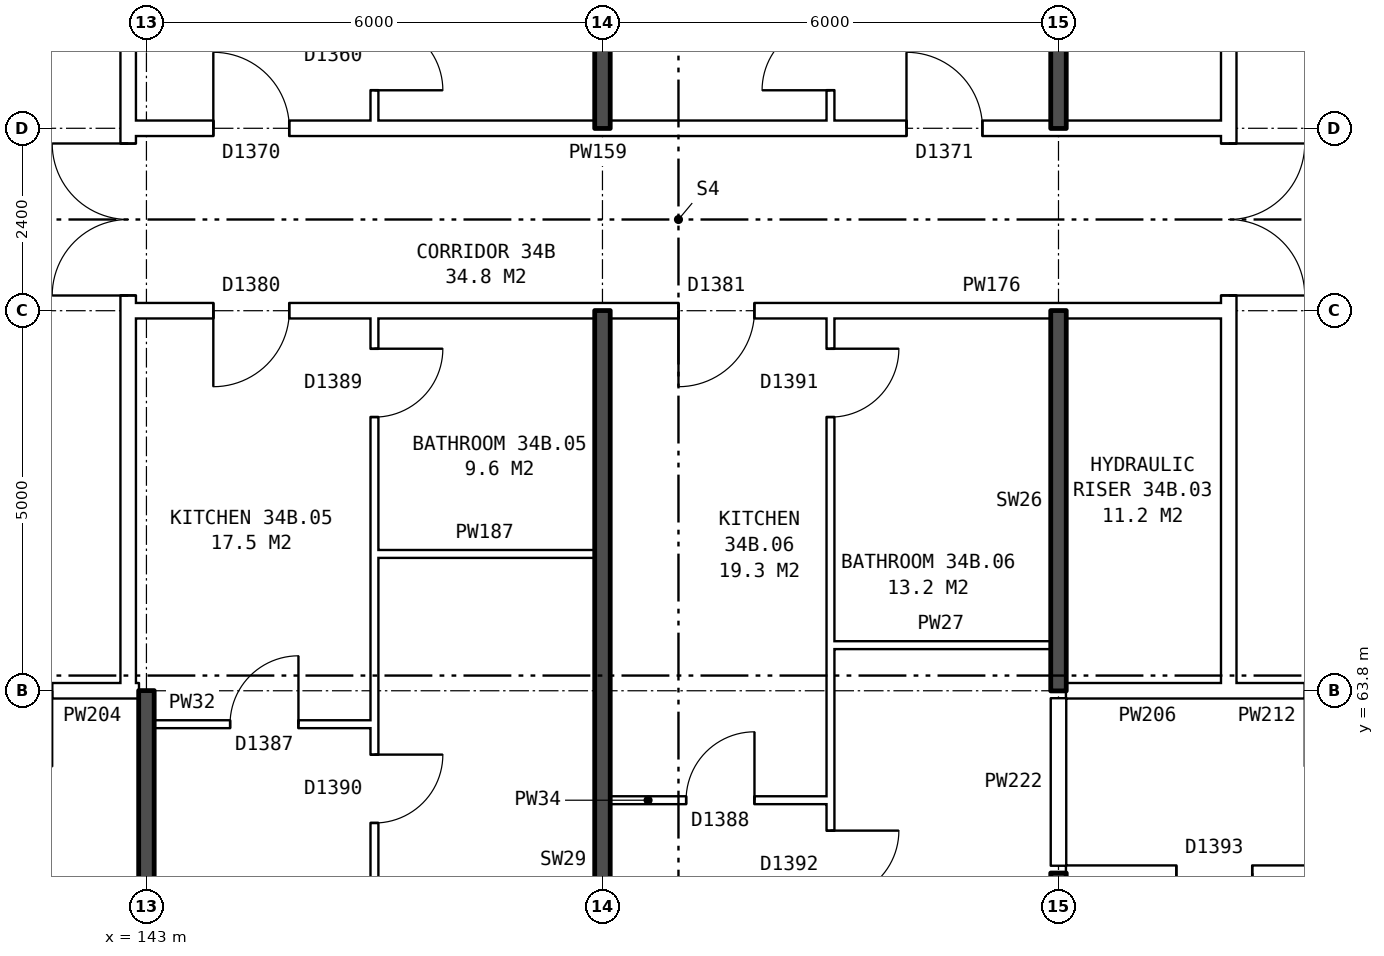
"""IFC4 building model, lengths in metres.
Left out: names, types, materials, properties, quantities, classifications, styles, units other than length and angle.
Written with IfcOpenShell. Run it as: python <this file> out.ifc"""

import sys

from ifc_helpers import new_model, si_unit, direction, frame, frame_2d, origin, place, context, subcontext, project, spatial, rectangle, extrude, element, fill, save


model = new_model("IFC4")
c1 = context("Model", 3, precision=1e-05, world=origin(), true_north=direction((0.0, 1.0)))
c2 = subcontext(c1, "Body", "Model", "MODEL_VIEW")
j1 = project(units=[si_unit("LENGTHUNIT", "METRE"), si_unit("PLANEANGLEUNIT", "RADIAN")], contexts=[c1])
p1 = place(None, origin())
s1 = spatial("IfcSite", under=j1, at=p1, CompositionType="ELEMENT")
p2 = place(p1, origin())
s2 = spatial("IfcBuilding", under=s1, at=p2, CompositionType="ELEMENT")
p3 = place(p2, frame((0.0, 0.0, 123.7)))
s3 = spatial("IfcBuildingStorey", under=s2, at=p3, CompositionType="ELEMENT", Elevation=123.7)
p4 = place(p3, frame((142.76, 63.9, 0.0), z_axis=(0.0, 0.0, 1.0), x_axis=(0.0, 1.0, 0.0)))
e1 = element("IfcWall", 1, at=p4, inside=s3, PredefinedType="PARTITIONING", context=c2, shape_type="SweptSolid", body=[
    extrude(rectangle(XDim=12.2, YDim=0.2, at=frame_2d((6.1, 0.0))), origin(), (0.0, 0.0, 1.0), 2.85),
])
p5 = place(p4, frame((5.1, 0.0, 0.0)))
e2 = element("IfcOpeningElement", 2, at=p5, cuts=e1, PredefinedType="OPENING", context=c2, shape_type="SweptSolid", body=[
    extrude(rectangle(XDim=2.0, YDim=2.1, at=frame_2d((1.0, 1.05))), frame((0.0, 0.11, 0.0), z_axis=(0.0, -1.0, 0.0), x_axis=(1.0, 0.0, 0.0)), (0.0, 0.0, 1.0), 0.22),
])
p6 = place(p3, frame((157.24, 63.9, 0.0), z_axis=(0.0, 0.0, 1.0), x_axis=(0.0, 1.0, 0.0)))
e3 = element("IfcWall", 3, at=p6, inside=s3, PredefinedType="PARTITIONING", context=c2, shape_type="SweptSolid", body=[
    extrude(rectangle(XDim=12.2, YDim=0.2, at=frame_2d((6.1, 0.0))), origin(), (0.0, 0.0, 1.0), 2.85),
])
p7 = place(p6, frame((5.1, 0.0, 0.0)))
e4 = element("IfcOpeningElement", 4, at=p7, cuts=e3, PredefinedType="OPENING", context=c2, shape_type="SweptSolid", body=[
    extrude(rectangle(XDim=2.0, YDim=2.1, at=frame_2d((1.0, 1.05))), frame((0.0, 0.11, 0.0), z_axis=(0.0, -1.0, 0.0), x_axis=(1.0, 0.0, 0.0)), (0.0, 0.0, 1.0), 0.22),
])
p8 = place(p3, frame((155.1, 61.4, 0.0), z_axis=(0.0, 0.0, 1.0), x_axis=(1.0, 0.0, 0.0)))
e5 = element("IfcWall", 5, at=p8, inside=s3, PredefinedType="PARTITIONING", context=c2, shape_type="SweptSolid", body=[
    extrude(rectangle(XDim=17.29, YDim=0.2, at=frame_2d((8.645, 0.0))), origin(), (0.0, 0.0, 1.0), 2.85),
])
p9 = place(p8, frame((1.45, 0.0, 0.0)))
e6 = element("IfcOpeningElement", 6, at=p9, cuts=e5, PredefinedType="OPENING", context=c2, shape_type="SweptSolid", body=[
    extrude(rectangle(XDim=1.0, YDim=2.1, at=frame_2d((0.5, 1.05))), frame((0.0, 0.11, 0.0), z_axis=(0.0, -1.0, 0.0), x_axis=(1.0, 0.0, 0.0)), (0.0, 0.0, 1.0), 0.22),
])
p10 = place(p8, frame((8.4, 0.0, 0.0)))
e7 = element("IfcOpeningElement", 7, at=p10, cuts=e5, PredefinedType="OPENING", context=c2, shape_type="SweptSolid", body=[
    extrude(rectangle(XDim=1.0, YDim=2.1, at=frame_2d((0.5, 1.05))), frame((0.0, 0.11, 0.0), z_axis=(0.0, -1.0, 0.0), x_axis=(1.0, 0.0, 0.0)), (0.0, 0.0, 1.0), 0.22),
])
p11 = place(p3, frame((149.1, 62.36, 0.0), z_axis=(0.0, 0.0, 1.0), x_axis=(1.0, 0.0, 0.0)))
e8 = element("IfcWall", 8, at=p11, inside=s3, PredefinedType="PARTITIONING", context=c2, shape_type="SweptSolid", body=[
    extrude(rectangle(XDim=2.9, YDim=0.1, at=frame_2d((1.45, 0.0))), origin(), (0.0, 0.0, 1.0), 2.85),
])
p12 = place(p11, frame((1.0, 0.0, 0.0)))
e9 = element("IfcOpeningElement", 9, at=p12, cuts=e8, PredefinedType="OPENING", context=c2, shape_type="SweptSolid", body=[
    extrude(rectangle(XDim=0.9, YDim=2.1, at=frame_2d((0.45, 1.05))), frame((0.0, 0.06, 0.0), z_axis=(0.0, -1.0, 0.0), x_axis=(1.0, 0.0, 0.0)), (0.0, 0.0, 1.0), 0.12),
])
p13 = place(p3, frame((143.1, 63.36, 0.0), z_axis=(0.0, 0.0, 1.0), x_axis=(1.0, 0.0, 0.0)))
e10 = element("IfcWall", 10, at=p13, inside=s3, PredefinedType="PARTITIONING", context=c2, shape_type="SweptSolid", body=[
    extrude(rectangle(XDim=2.9, YDim=0.1, at=frame_2d((1.45, 0.0))), origin(), (0.0, 0.0, 1.0), 2.85),
])
p14 = place(p13, frame((1.0, 0.0, 0.0)))
e11 = element("IfcOpeningElement", 11, at=p14, cuts=e10, PredefinedType="OPENING", context=c2, shape_type="SweptSolid", body=[
    extrude(rectangle(XDim=0.9, YDim=2.1, at=frame_2d((0.45, 1.05))), frame((0.0, 0.06, 0.0), z_axis=(0.0, -1.0, 0.0), x_axis=(1.0, 0.0, 0.0)), (0.0, 0.0, 1.0), 0.12),
])
p15 = place(p3, frame((139.76, 63.8, 0.0), z_axis=(0.0, 0.0, 1.0), x_axis=(1.0, 0.0, 0.0)))
e12 = element("IfcWall", 12, at=p15, inside=s3, PredefinedType="PARTITIONING", context=c2, shape_type="SweptSolid", body=[
    extrude(rectangle(XDim=3.0, YDim=0.2, at=frame_2d((1.5, 0.0))), origin(), (0.0, 0.0, 1.0), 2.85),
])
p16 = place(p15, frame((1.0, 0.0, 0.0)))
e13 = element("IfcOpeningElement", 13, at=p16, cuts=e12, PredefinedType="OPENING", context=c2, shape_type="SweptSolid", body=[
    extrude(rectangle(XDim=1.0, YDim=2.1, at=frame_2d((0.5, 1.05))), frame((0.0, 0.11, 0.0), z_axis=(0.0, -1.0, 0.0), x_axis=(1.0, 0.0, 0.0)), (0.0, 0.0, 1.0), 0.22),
])
p17 = place(p3, frame((142.76, 63.8, 0.0), z_axis=(0.0, 0.0, 1.0), x_axis=(1.0, 0.0, 0.0)))
e14 = element("IfcWall", 14, at=p17, inside=s3, PredefinedType="PARTITIONING", context=c2, shape_type="SweptSolid", body=[
    extrude(rectangle(XDim=0.14, YDim=0.2, at=frame_2d((0.07, 0.0))), origin(), (0.0, 0.0, 1.0), 2.85),
])
p18 = place(p3, frame((155.1, 63.8, 0.0), z_axis=(0.0, 0.0, 1.0), x_axis=(1.0, 0.0, 0.0)))
e15 = element("IfcWall", 15, at=p18, inside=s3, PredefinedType="PARTITIONING", context=c2, shape_type="SweptSolid", body=[
    extrude(rectangle(XDim=2.14, YDim=0.2, at=frame_2d((1.07, 0.0))), origin(), (0.0, 0.0, 1.0), 2.85),
])
p19 = place(p3, frame((157.24, 63.8, 0.0), z_axis=(0.0, 0.0, 1.0), x_axis=(1.0, 0.0, 0.0)))
e16 = element("IfcWall", 16, at=p19, inside=s3, PredefinedType="PARTITIONING", context=c2, shape_type="SweptSolid", body=[
    extrude(rectangle(XDim=3.0, YDim=0.2, at=frame_2d((1.5, 0.0))), origin(), (0.0, 0.0, 1.0), 2.85),
])
p20 = place(p19, frame((1.0, 0.0, 0.0)))
e17 = element("IfcOpeningElement", 17, at=p20, cuts=e16, PredefinedType="OPENING", context=c2, shape_type="SweptSolid", body=[
    extrude(rectangle(XDim=1.0, YDim=2.1, at=frame_2d((0.5, 1.05))), frame((0.0, 0.11, 0.0), z_axis=(0.0, -1.0, 0.0), x_axis=(1.0, 0.0, 0.0)), (0.0, 0.0, 1.0), 0.22),
])
for number, where, z_axis, x_axis in (
    (18, (152.0, 64.4, 0.0), (0.0, 0.0, 1.0), (1.0, 0.0, 0.0)),
    (19, (146.0, 65.6, 0.0), (0.0, 0.0, 1.0), (1.0, 0.0, 0.0)),
):
    element("IfcWall", number, at=place(p3, frame(where, z_axis=z_axis, x_axis=x_axis)), inside=s3, PredefinedType="PARTITIONING", context=c2, shape_type="SweptSolid", body=[
        extrude(rectangle(XDim=2.9, YDim=0.1, at=frame_2d((1.45, 0.0))), origin(), (0.0, 0.0, 1.0), 2.85),
    ])
p21 = place(p3, frame((142.76, 68.8, 0.0), z_axis=(0.0, 0.0, 1.0), x_axis=(1.0, 0.0, 0.0)))
e20 = element("IfcWall", 20, at=p21, inside=s3, PredefinedType="PARTITIONING", context=c2, shape_type="SweptSolid", body=[
    extrude(rectangle(XDim=14.48, YDim=0.2, at=frame_2d((7.24, 0.0))), origin(), (0.0, 0.0, 1.0), 2.85),
])
p22 = place(p21, frame((1.12, 0.0, 0.0)))
e21 = element("IfcOpeningElement", 21, at=p22, cuts=e20, PredefinedType="OPENING", context=c2, shape_type="SweptSolid", body=[
    extrude(rectangle(XDim=1.0, YDim=2.1, at=frame_2d((0.5, 1.05))), frame((0.0, 0.11, 0.0), z_axis=(0.0, -1.0, 0.0), x_axis=(1.0, 0.0, 0.0)), (0.0, 0.0, 1.0), 0.22),
])
p23 = place(p21, frame((7.24, 0.0, 0.0)))
e22 = element("IfcOpeningElement", 22, at=p23, cuts=e20, PredefinedType="OPENING", context=c2, shape_type="SweptSolid", body=[
    extrude(rectangle(XDim=1.0, YDim=2.1, at=frame_2d((0.5, 1.05))), frame((0.0, 0.11, 0.0), z_axis=(0.0, -1.0, 0.0), x_axis=(1.0, 0.0, 0.0)), (0.0, 0.0, 1.0), 0.22),
])
p24 = place(p3, frame((142.76, 71.2, 0.0), z_axis=(0.0, 0.0, 1.0), x_axis=(1.0, 0.0, 0.0)))
e23 = element("IfcWall", 23, at=p24, inside=s3, PredefinedType="PARTITIONING", context=c2, shape_type="SweptSolid", body=[
    extrude(rectangle(XDim=14.48, YDim=0.2, at=frame_2d((7.24, 0.0))), origin(), (0.0, 0.0, 1.0), 2.85),
])
p25 = place(p24, frame((1.12, 0.0, 0.0)))
e24 = element("IfcOpeningElement", 24, at=p25, cuts=e23, PredefinedType="OPENING", context=c2, shape_type="SweptSolid", body=[
    extrude(rectangle(XDim=1.0, YDim=2.1, at=frame_2d((0.5, 1.05))), frame((0.0, 0.11, 0.0), z_axis=(0.0, -1.0, 0.0), x_axis=(1.0, 0.0, 0.0)), (0.0, 0.0, 1.0), 0.22),
])
p26 = place(p24, frame((10.24, 0.0, 0.0)))
e25 = element("IfcOpeningElement", 25, at=p26, cuts=e23, PredefinedType="OPENING", context=c2, shape_type="SweptSolid", body=[
    extrude(rectangle(XDim=1.0, YDim=2.1, at=frame_2d((0.5, 1.05))), frame((0.0, 0.11, 0.0), z_axis=(0.0, -1.0, 0.0), x_axis=(1.0, 0.0, 0.0)), (0.0, 0.0, 1.0), 0.22),
])
p27 = place(p3, frame((143.0, 54.36, 0.0), z_axis=(0.0, 0.0, 1.0), x_axis=(0.0, 1.0, 0.0)))
e26 = element("IfcWall", 26, at=p27, inside=s3, PredefinedType="SOLIDWALL", context=c2, shape_type="SweptSolid", body=[
    extrude(rectangle(XDim=9.44, YDim=0.2, at=frame_2d((4.72, 0.0))), origin(), (0.0, 0.0, 1.0), 2.85),
])
p28 = place(p3, frame((146.0, 54.36, 0.0), z_axis=(0.0, 0.0, 1.0), x_axis=(0.0, 1.0, 0.0)))
e27 = element("IfcWall", 27, at=p28, inside=s3, PredefinedType="PARTITIONING", context=c2, shape_type="SweptSolid", body=[
    extrude(rectangle(XDim=14.34, YDim=0.1, at=frame_2d((7.17, 0.0))), origin(), (0.0, 0.0, 1.0), 2.85),
])
p29 = place(p28, frame((7.7, 0.0, 0.0)))
e28 = element("IfcOpeningElement", 28, at=p29, cuts=e27, PredefinedType="OPENING", context=c2, shape_type="SweptSolid", body=[
    extrude(rectangle(XDim=0.9, YDim=2.1, at=frame_2d((0.45, 1.05))), frame((0.0, 0.06, 0.0), z_axis=(0.0, -1.0, 0.0), x_axis=(1.0, 0.0, 0.0)), (0.0, 0.0, 1.0), 0.12),
])
p30 = place(p28, frame((13.04, 0.0, 0.0)))
e29 = element("IfcOpeningElement", 29, at=p30, cuts=e27, PredefinedType="OPENING", context=c2, shape_type="SweptSolid", body=[
    extrude(rectangle(XDim=0.9, YDim=2.1, at=frame_2d((0.45, 1.05))), frame((0.0, 0.06, 0.0), z_axis=(0.0, -1.0, 0.0), x_axis=(1.0, 0.0, 0.0)), (0.0, 0.0, 1.0), 0.12),
])
p31 = place(p3, frame((146.0, 71.3, 0.0), z_axis=(0.0, 0.0, 1.0), x_axis=(0.0, 1.0, 0.0)))
e30 = element("IfcWall", 30, at=p31, inside=s3, PredefinedType="PARTITIONING", context=c2, shape_type="SweptSolid", body=[
    extrude(rectangle(XDim=14.34, YDim=0.1, at=frame_2d((7.17, 0.0))), origin(), (0.0, 0.0, 1.0), 2.85),
])
p32 = place(p31, frame((6.74, 0.0, 0.0)))
e31 = element("IfcOpeningElement", 31, at=p32, cuts=e30, PredefinedType="OPENING", context=c2, shape_type="SweptSolid", body=[
    extrude(rectangle(XDim=0.9, YDim=2.1, at=frame_2d((0.45, 1.05))), frame((0.0, 0.06, 0.0), z_axis=(0.0, -1.0, 0.0), x_axis=(1.0, 0.0, 0.0)), (0.0, 0.0, 1.0), 0.12),
])
p33 = place(p31, frame((0.4, 0.0, 0.0)))
e32 = element("IfcOpeningElement", 32, at=p33, cuts=e30, PredefinedType="OPENING", context=c2, shape_type="SweptSolid", body=[
    extrude(rectangle(XDim=0.9, YDim=2.1, at=frame_2d((0.45, 1.05))), frame((0.0, 0.06, 0.0), z_axis=(0.0, -1.0, 0.0), x_axis=(1.0, 0.0, 0.0)), (0.0, 0.0, 1.0), 0.12),
])
for number, where, z_axis, x_axis in (
    (33, (149.0, 54.36, 0.0), (0.0, 0.0, 1.0), (0.0, 1.0, 0.0)),
    (34, (149.0, 71.2, 0.0), (0.0, 0.0, 1.0), (0.0, 1.0, 0.0)),
):
    element("IfcWall", number, at=place(p3, frame(where, z_axis=z_axis, x_axis=x_axis)), inside=s3, PredefinedType="SOLIDWALL", context=c2, shape_type="SweptSolid", body=[
        extrude(rectangle(XDim=14.44, YDim=0.2, at=frame_2d((7.22, 0.0))), origin(), (0.0, 0.0, 1.0), 2.85),
    ])
p34 = place(p3, frame((152.0, 54.36, 0.0), z_axis=(0.0, 0.0, 1.0), x_axis=(0.0, 1.0, 0.0)))
e35 = element("IfcWall", 35, at=p34, inside=s3, PredefinedType="PARTITIONING", context=c2, shape_type="SweptSolid", body=[
    extrude(rectangle(XDim=14.34, YDim=0.1, at=frame_2d((7.17, 0.0))), origin(), (0.0, 0.0, 1.0), 2.85),
])
p35 = place(p34, frame((6.7, 0.0, 0.0)))
e36 = element("IfcOpeningElement", 36, at=p35, cuts=e35, PredefinedType="OPENING", context=c2, shape_type="SweptSolid", body=[
    extrude(rectangle(XDim=0.9, YDim=2.1, at=frame_2d((0.45, 1.05))), frame((0.0, 0.06, 0.0), z_axis=(0.0, -1.0, 0.0), x_axis=(1.0, 0.0, 0.0)), (0.0, 0.0, 1.0), 0.12),
])
p36 = place(p34, frame((13.04, 0.0, 0.0)))
e37 = element("IfcOpeningElement", 37, at=p36, cuts=e35, PredefinedType="OPENING", context=c2, shape_type="SweptSolid", body=[
    extrude(rectangle(XDim=0.9, YDim=2.1, at=frame_2d((0.45, 1.05))), frame((0.0, 0.06, 0.0), z_axis=(0.0, -1.0, 0.0), x_axis=(1.0, 0.0, 0.0)), (0.0, 0.0, 1.0), 0.12),
])
p37 = place(p3, frame((152.0, 71.3, 0.0), z_axis=(0.0, 0.0, 1.0), x_axis=(0.0, 1.0, 0.0)))
e38 = element("IfcWall", 38, at=p37, inside=s3, PredefinedType="PARTITIONING", context=c2, shape_type="SweptSolid", body=[
    extrude(rectangle(XDim=14.34, YDim=0.1, at=frame_2d((7.17, 0.0))), origin(), (0.0, 0.0, 1.0), 2.85),
])
p38 = place(p37, frame((6.74, 0.0, 0.0)))
e39 = element("IfcOpeningElement", 39, at=p38, cuts=e38, PredefinedType="OPENING", context=c2, shape_type="SweptSolid", body=[
    extrude(rectangle(XDim=0.9, YDim=2.1, at=frame_2d((0.45, 1.05))), frame((0.0, 0.06, 0.0), z_axis=(0.0, -1.0, 0.0), x_axis=(1.0, 0.0, 0.0)), (0.0, 0.0, 1.0), 0.12),
])
p39 = place(p37, frame((0.4, 0.0, 0.0)))
e40 = element("IfcOpeningElement", 40, at=p39, cuts=e38, PredefinedType="OPENING", context=c2, shape_type="SweptSolid", body=[
    extrude(rectangle(XDim=0.9, YDim=2.1, at=frame_2d((0.45, 1.05))), frame((0.0, 0.06, 0.0), z_axis=(0.0, -1.0, 0.0), x_axis=(1.0, 0.0, 0.0)), (0.0, 0.0, 1.0), 0.12),
])
p40 = place(p3, frame((155.0, 54.36, 0.0), z_axis=(0.0, 0.0, 1.0), x_axis=(0.0, 1.0, 0.0)))
e41 = element("IfcWall", 41, at=p40, inside=s3, PredefinedType="SOLIDWALL", context=c2, shape_type="SweptSolid", body=[
    extrude(rectangle(XDim=7.04, YDim=0.2, at=frame_2d((3.52, 0.0))), origin(), (0.0, 0.0, 1.0), 2.85),
])
p41 = place(p3, frame((155.0, 61.5, 0.0), z_axis=(0.0, 0.0, 1.0), x_axis=(0.0, 1.0, 0.0)))
e42 = element("IfcWall", 42, at=p41, inside=s3, PredefinedType="PARTITIONING", context=c2, shape_type="SweptSolid", body=[
    extrude(rectangle(XDim=2.2, YDim=0.2, at=frame_2d((1.1, 0.0))), origin(), (0.0, 0.0, 1.0), 2.85),
])
for number, where, z_axis, x_axis in (
    (43, (155.0, 63.8, 0.0), (0.0, 0.0, 1.0), (0.0, 1.0, 0.0)),
    (44, (155.0, 71.2, 0.0), (0.0, 0.0, 1.0), (0.0, 1.0, 0.0)),
):
    element("IfcWall", number, at=place(p3, frame(where, z_axis=z_axis, x_axis=x_axis)), inside=s3, PredefinedType="SOLIDWALL", context=c2, shape_type="SweptSolid", body=[
        extrude(rectangle(XDim=5.0, YDim=0.2, at=frame_2d((2.5, 0.0))), origin(), (0.0, 0.0, 1.0), 2.85),
    ])
p42 = place(p5, origin())
e45 = element("IfcDoor", 45, at=p42, inside=s3, OperationType="DOUBLE_DOOR_SINGLE_SWING", PredefinedType="DOOR", context=c2, shape_type="SweptSolid", body=[
    extrude(rectangle(XDim=2.0, YDim=2.1, at=frame_2d((1.0, 1.05))), frame((0.0, 0.025, 0.0), z_axis=(0.0, -1.0, 0.0), x_axis=(1.0, 0.0, 0.0)), (0.0, 0.0, 1.0), 0.05),
])
fill(e2, e45)
p43 = place(p7, frame((2.0, 0.0, 0.0), z_axis=(0.0, 0.0, 1.0), x_axis=(-1.0, 0.0, 0.0)))
e46 = element("IfcDoor", 46, at=p43, inside=s3, OperationType="DOUBLE_DOOR_SINGLE_SWING", PredefinedType="DOOR", context=c2, shape_type="SweptSolid", body=[
    extrude(rectangle(XDim=2.0, YDim=2.1, at=frame_2d((1.0, 1.05))), frame((0.0, 0.025, 0.0), z_axis=(0.0, -1.0, 0.0), x_axis=(1.0, 0.0, 0.0)), (0.0, 0.0, 1.0), 0.05),
])
fill(e4, e46)
p44 = place(p29, frame((0.9, 0.0, 0.0), z_axis=(0.0, 0.0, 1.0), x_axis=(-1.0, 0.0, 0.0)))
e47 = element("IfcDoor", 47, at=p44, inside=s3, OperationType="SINGLE_SWING_LEFT", PredefinedType="DOOR", context=c2, shape_type="SweptSolid", body=[
    extrude(rectangle(XDim=0.9, YDim=2.1, at=frame_2d((0.45, 1.05))), frame((0.0, 0.025, 0.0), z_axis=(0.0, -1.0, 0.0), x_axis=(1.0, 0.0, 0.0)), (0.0, 0.0, 1.0), 0.05),
])
fill(e28, e47)
p45 = place(p22, frame((1.0, 0.0, 0.0), z_axis=(0.0, 0.0, 1.0), x_axis=(-1.0, 0.0, 0.0)))
e48 = element("IfcDoor", 48, at=p45, inside=s3, OperationType="SINGLE_SWING_RIGHT", PredefinedType="DOOR", context=c2, shape_type="SweptSolid", body=[
    extrude(rectangle(XDim=1.0, YDim=2.1, at=frame_2d((0.5, 1.05))), frame((0.0, 0.025, 0.0), z_axis=(0.0, -1.0, 0.0), x_axis=(1.0, 0.0, 0.0)), (0.0, 0.0, 1.0), 0.05),
])
fill(e21, e48)
p46 = place(p14, origin())
e49 = element("IfcDoor", 49, at=p46, inside=s3, OperationType="SINGLE_SWING_RIGHT", PredefinedType="DOOR", context=c2, shape_type="SweptSolid", body=[
    extrude(rectangle(XDim=0.9, YDim=2.1, at=frame_2d((0.45, 1.05))), frame((0.0, 0.025, 0.0), z_axis=(0.0, -1.0, 0.0), x_axis=(1.0, 0.0, 0.0)), (0.0, 0.0, 1.0), 0.05),
])
fill(e11, e49)
p47 = place(p30, frame((0.9, 0.0, 0.0), z_axis=(0.0, 0.0, 1.0), x_axis=(-1.0, 0.0, 0.0)))
e50 = element("IfcDoor", 50, at=p47, inside=s3, OperationType="SINGLE_SWING_LEFT", PredefinedType="DOOR", context=c2, shape_type="SweptSolid", body=[
    extrude(rectangle(XDim=0.9, YDim=2.1, at=frame_2d((0.45, 1.05))), frame((0.0, 0.025, 0.0), z_axis=(0.0, -1.0, 0.0), x_axis=(1.0, 0.0, 0.0)), (0.0, 0.0, 1.0), 0.05),
])
fill(e29, e50)
p48 = place(p35, frame((0.9, 0.0, 0.0), z_axis=(0.0, 0.0, 1.0), x_axis=(-1.0, 0.0, 0.0)))
e51 = element("IfcDoor", 51, at=p48, inside=s3, OperationType="SINGLE_SWING_LEFT", PredefinedType="DOOR", context=c2, shape_type="SweptSolid", body=[
    extrude(rectangle(XDim=0.9, YDim=2.1, at=frame_2d((0.45, 1.05))), frame((0.0, 0.025, 0.0), z_axis=(0.0, -1.0, 0.0), x_axis=(1.0, 0.0, 0.0)), (0.0, 0.0, 1.0), 0.05),
])
fill(e36, e51)
p49 = place(p23, frame((1.0, 0.0, 0.0), z_axis=(0.0, 0.0, 1.0), x_axis=(-1.0, 0.0, 0.0)))
e52 = element("IfcDoor", 52, at=p49, inside=s3, OperationType="SINGLE_SWING_RIGHT", PredefinedType="DOOR", context=c2, shape_type="SweptSolid", body=[
    extrude(rectangle(XDim=1.0, YDim=2.1, at=frame_2d((0.5, 1.05))), frame((0.0, 0.025, 0.0), z_axis=(0.0, -1.0, 0.0), x_axis=(1.0, 0.0, 0.0)), (0.0, 0.0, 1.0), 0.05),
])
fill(e22, e52)
p50 = place(p12, origin())
e53 = element("IfcDoor", 53, at=p50, inside=s3, OperationType="SINGLE_SWING_RIGHT", PredefinedType="DOOR", context=c2, shape_type="SweptSolid", body=[
    extrude(rectangle(XDim=0.9, YDim=2.1, at=frame_2d((0.45, 1.05))), frame((0.0, 0.025, 0.0), z_axis=(0.0, -1.0, 0.0), x_axis=(1.0, 0.0, 0.0)), (0.0, 0.0, 1.0), 0.05),
])
fill(e9, e53)
p51 = place(p36, frame((0.9, 0.0, 0.0), z_axis=(0.0, 0.0, 1.0), x_axis=(-1.0, 0.0, 0.0)))
e54 = element("IfcDoor", 54, at=p51, inside=s3, OperationType="SINGLE_SWING_LEFT", PredefinedType="DOOR", context=c2, shape_type="SweptSolid", body=[
    extrude(rectangle(XDim=0.9, YDim=2.1, at=frame_2d((0.45, 1.05))), frame((0.0, 0.025, 0.0), z_axis=(0.0, -1.0, 0.0), x_axis=(1.0, 0.0, 0.0)), (0.0, 0.0, 1.0), 0.05),
])
fill(e37, e54)
p52 = place(p25, origin())
e55 = element("IfcDoor", 55, at=p52, inside=s3, OperationType="SINGLE_SWING_LEFT", PredefinedType="DOOR", context=c2, shape_type="SweptSolid", body=[
    extrude(rectangle(XDim=1.0, YDim=2.1, at=frame_2d((0.5, 1.05))), frame((0.0, 0.025, 0.0), z_axis=(0.0, -1.0, 0.0), x_axis=(1.0, 0.0, 0.0)), (0.0, 0.0, 1.0), 0.05),
])
fill(e24, e55)
p53 = place(p33, frame((0.9, 0.0, 0.0), z_axis=(0.0, 0.0, 1.0), x_axis=(-1.0, 0.0, 0.0)))
e56 = element("IfcDoor", 56, at=p53, inside=s3, OperationType="SINGLE_SWING_RIGHT", PredefinedType="DOOR", context=c2, shape_type="SweptSolid", body=[
    extrude(rectangle(XDim=0.9, YDim=2.1, at=frame_2d((0.45, 1.05))), frame((0.0, 0.025, 0.0), z_axis=(0.0, -1.0, 0.0), x_axis=(1.0, 0.0, 0.0)), (0.0, 0.0, 1.0), 0.05),
])
fill(e32, e56)
p54 = place(p26, origin())
e57 = element("IfcDoor", 57, at=p54, inside=s3, OperationType="SINGLE_SWING_LEFT", PredefinedType="DOOR", context=c2, shape_type="SweptSolid", body=[
    extrude(rectangle(XDim=1.0, YDim=2.1, at=frame_2d((0.5, 1.05))), frame((0.0, 0.025, 0.0), z_axis=(0.0, -1.0, 0.0), x_axis=(1.0, 0.0, 0.0)), (0.0, 0.0, 1.0), 0.05),
])
fill(e25, e57)
p55 = place(p39, origin())
e58 = element("IfcDoor", 58, at=p55, inside=s3, OperationType="SINGLE_SWING_LEFT", PredefinedType="DOOR", context=c2, shape_type="SweptSolid", body=[
    extrude(rectangle(XDim=0.9, YDim=2.1, at=frame_2d((0.45, 1.05))), frame((0.0, 0.025, 0.0), z_axis=(0.0, -1.0, 0.0), x_axis=(1.0, 0.0, 0.0)), (0.0, 0.0, 1.0), 0.05),
])
fill(e40, e58)
p56 = place(p9, frame((1.0, 0.0, 0.0), z_axis=(0.0, 0.0, 1.0), x_axis=(-1.0, 0.0, 0.0)))
e59 = element("IfcDoor", 59, at=p56, inside=s3, OperationType="SINGLE_SWING_LEFT", PredefinedType="DOOR", context=c2, shape_type="SweptSolid", body=[
    extrude(rectangle(XDim=1.0, YDim=2.1, at=frame_2d((0.5, 1.05))), frame((0.0, 0.025, 0.0), z_axis=(0.0, -1.0, 0.0), x_axis=(1.0, 0.0, 0.0)), (0.0, 0.0, 1.0), 0.05),
])
fill(e6, e59)
save(model, sys.argv[1])
